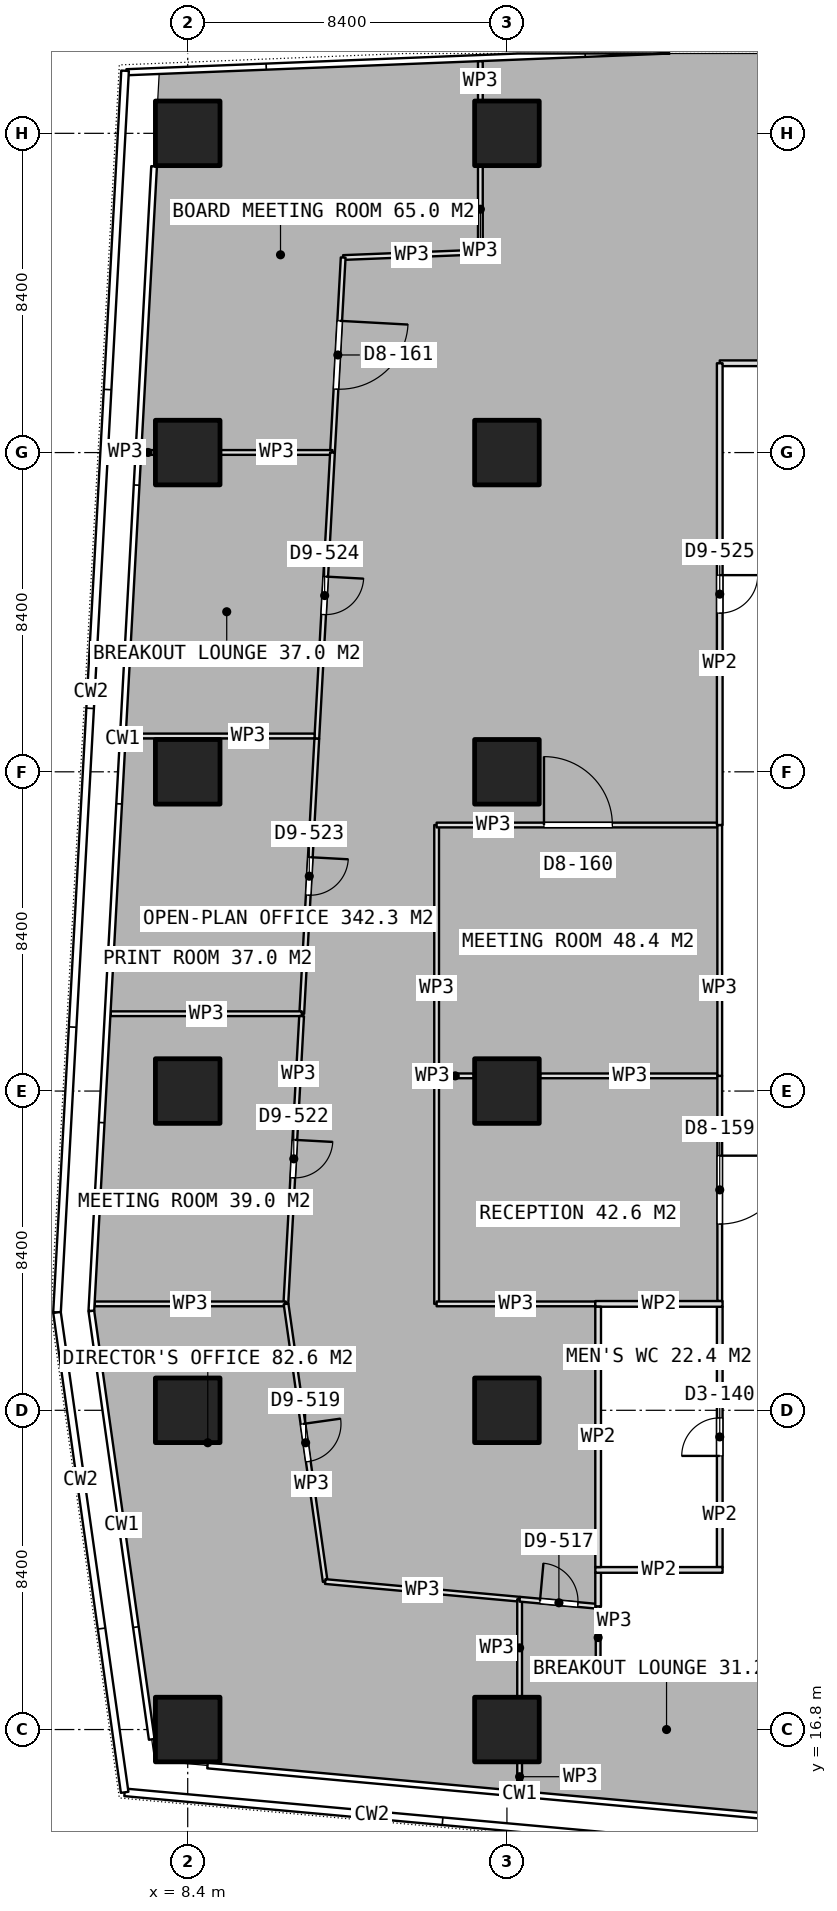
"""IFC4 building model, lengths in metres.
Left out: names, types, materials, properties, quantities, classifications, styles, units other than length and angle.
Written with IfcOpenShell. Run it as: python <this file> out.ifc"""

import sys

from ifc_helpers import new_model, si_unit, direction, frame, frame_2d, origin, origin_2d, place, context, subcontext, project, spatial, rectangle, extrude, element, fill, save


model = new_model("IFC4")
c1 = context("Model", 3, precision=1e-05, world=origin(), true_north=direction((0.0, 1.0)))
c2 = subcontext(c1, "Body", "Model", "MODEL_VIEW")
j1 = project(units=[si_unit("LENGTHUNIT", "METRE"), si_unit("PLANEANGLEUNIT", "RADIAN")], contexts=[c1])
p1 = place(None, origin())
s1 = spatial("IfcSite", under=j1, at=p1, CompositionType="ELEMENT")
p2 = place(p1, origin())
s2 = spatial("IfcBuilding", under=s1, at=p2, CompositionType="ELEMENT")
p3 = place(p2, frame((0.0, 0.0, 132.8)))
s3 = spatial("IfcBuildingStorey", under=s2, at=p3, CompositionType="ELEMENT", Elevation=132.8)
for number, where, z_axis, x_axis in (
    (1, (8.4, 16.8, 0.0), (0.0, 0.0, 1.0), (1.0, 0.0, 0.0)),
    (2, (8.4, 25.2, 0.0), (0.0, 0.0, 1.0), (1.0, 0.0, 0.0)),
    (3, (8.4, 33.6, 0.0), (0.0, 0.0, 1.0), (1.0, 0.0, 0.0)),
    (4, (8.4, 42.0, 0.0), (0.0, 0.0, 1.0), (1.0, 0.0, 0.0)),
    (5, (8.4, 50.4, 0.0), (0.0, 0.0, 1.0), (1.0, 0.0, 0.0)),
    (6, (8.4, 58.8, 0.0), (0.0, 0.0, 1.0), (1.0, 0.0, 0.0)),
    (7, (16.8, 16.8, 0.0), (0.0, 0.0, 1.0), (1.0, 0.0, 0.0)),
    (8, (16.8, 25.2, 0.0), (0.0, 0.0, 1.0), (1.0, 0.0, 0.0)),
    (9, (16.8, 33.6, 0.0), (0.0, 0.0, 1.0), (1.0, 0.0, 0.0)),
    (10, (16.8, 42.0, 0.0), (0.0, 0.0, 1.0), (1.0, 0.0, 0.0)),
    (11, (16.8, 50.4, 0.0), (0.0, 0.0, 1.0), (1.0, 0.0, 0.0)),
    (12, (16.8, 58.8, 0.0), (0.0, 0.0, 1.0), (1.0, 0.0, 0.0)),
):
    element("IfcColumn", number, at=place(p3, frame(where, z_axis=z_axis, x_axis=x_axis)), inside=s3, PredefinedType="COLUMN", context=c2, shape_type="SweptSolid", body=[
        extrude(rectangle(XDim=1.7, YDim=1.7, at=origin_2d()), origin(), (0.0, 0.0, 1.0), 3.75),
    ])
for number, where, z_axis, x_axis in (
    (13, (19.125, 21.0, 0.0), (0.0, 0.0, 1.0), (1.0, 0.0, 0.0)),
    (14, (19.125, 28.0, 0.0), (0.0, 0.0, 1.0), (1.0, 0.0, 0.0)),
):
    element("IfcWall", number, at=place(p3, frame(where, z_axis=z_axis, x_axis=x_axis)), inside=s3, PredefinedType="PARTITIONING", context=c2, shape_type="SweptSolid", body=[
        extrude(rectangle(XDim=3.35, YDim=0.15, at=frame_2d((1.675, 0.0))), origin(), (0.0, 0.0, 1.0), 3.5),
    ])
p4 = place(p3, frame((19.2, 21.075, 0.0), z_axis=(0.0, 0.0, 1.0), x_axis=(0.0, 1.0, 0.0)))
e15 = element("IfcWall", 15, at=p4, inside=s3, PredefinedType="PARTITIONING", context=c2, shape_type="SweptSolid", body=[
    extrude(rectangle(XDim=6.85, YDim=0.15, at=frame_2d((3.425, 0.0))), origin(), (0.0, 0.0, 1.0), 3.5),
])
p5 = place(p3, frame((22.4, 21.075, 0.0), z_axis=(0.0, 0.0, 1.0), x_axis=(0.0, 1.0, 0.0)))
e16 = element("IfcWall", 16, at=p5, inside=s3, PredefinedType="PARTITIONING", context=c2, shape_type="SweptSolid", body=[
    extrude(rectangle(XDim=6.85, YDim=0.15, at=frame_2d((3.425, 0.0))), origin(), (0.0, 0.0, 1.0), 3.5),
])
p6 = place(p5, frame((2.925, 0.0, 0.0)))
e17 = element("IfcOpeningElement", 17, at=p6, cuts=e16, PredefinedType="OPENING", context=c2, shape_type="SweptSolid", body=[
    extrude(rectangle(XDim=1.0, YDim=2.1, at=frame_2d((0.5, 1.05))), frame((0.0, 0.085, 0.0), z_axis=(0.0, -1.0, 0.0), x_axis=(1.0, 0.0, 0.0)), (0.0, 0.0, 1.0), 0.17),
])
p7 = place(p3, frame((16.101, 60.7, 0.0), z_axis=(0.0, 0.0, 1.0), x_axis=(0.0, -1.0, 0.0)))
e18 = element("IfcWall", 18, at=p7, inside=s3, PredefinedType="PARTITIONING", context=c2, shape_type="SweptSolid", body=[
    extrude(rectangle(XDim=1.03, YDim=0.125, at=frame_2d((0.515, 0.0))), origin(), (0.0, 0.0, 1.0), 3.5),
])
p8 = place(p3, frame((16.101, 57.93, 0.0), z_axis=(0.0, 0.0, 1.0), x_axis=(0.0, -1.0, 0.0)))
e19 = element("IfcWall", 19, at=p8, inside=s3, PredefinedType="PARTITIONING", context=c2, shape_type="SweptSolid", body=[
    extrude(rectangle(XDim=2.254, YDim=0.125, at=frame_2d((1.127, 0.0))), origin(), (0.0, 0.0, 1.0), 3.5),
])
p9 = place(p3, frame((16.101, 55.676, 0.0), z_axis=(0.0, 0.0, 1.0), x_axis=(-0.999204947676, -0.039868189567, 0.0)))
e20 = element("IfcWall", 20, at=p9, inside=s3, PredefinedType="PARTITIONING", context=c2, shape_type="SweptSolid", body=[
    extrude(rectangle(XDim=3.613, YDim=0.125, at=frame_2d((1.807, 0.0))), origin(), (0.0, 0.0, 1.0), 3.5),
])
p10 = place(p3, frame((12.491, 55.532, 0.0), z_axis=(0.0, 0.0, 1.0), x_axis=(-0.054706604425, -0.998502472422, 0.0)))
e21 = element("IfcWall", 21, at=p10, inside=s3, PredefinedType="PARTITIONING", context=c2, shape_type="SweptSolid", body=[
    extrude(rectangle(XDim=5.137, YDim=0.125, at=frame_2d((2.568, 0.0))), origin(), (0.0, 0.0, 1.0), 3.5),
])
p11 = place(p10, frame((1.668, 0.0, 0.0)))
e22 = element("IfcOpeningElement", 22, at=p11, cuts=e21, PredefinedType="OPENING", context=c2, shape_type="SweptSolid", body=[
    extrude(rectangle(XDim=1.8, YDim=2.1, at=frame_2d((0.9, 1.05))), frame((0.0, 0.073, 0.0), z_axis=(0.0, -1.0, 0.0), x_axis=(1.0, 0.0, 0.0)), (0.0, 0.0, 1.0), 0.145),
])
p12 = place(p3, frame((12.21, 50.403, 0.0), z_axis=(0.0, 0.0, 1.0), x_axis=(-1.0, 0.0, 0.0)))
e23 = element("IfcWall", 23, at=p12, inside=s3, PredefinedType="PARTITIONING", context=c2, shape_type="SweptSolid", body=[
    extrude(rectangle(XDim=2.94, YDim=0.125, at=frame_2d((1.47, 0.0))), origin(), (0.0, 0.0, 1.0), 3.5),
])
p13 = place(p3, frame((7.53, 50.403, 0.0), z_axis=(0.0, 0.0, 1.0), x_axis=(-1.0, 0.0, 0.0)))
e24 = element("IfcWall", 24, at=p13, inside=s3, PredefinedType="PARTITIONING", context=c2, shape_type="SweptSolid", body=[
    extrude(rectangle(XDim=0.347, YDim=0.125, at=frame_2d((0.173, 0.0))), origin(), (0.0, 0.0, 1.0), 3.5),
])
p14 = place(p3, frame((12.21, 50.402, 0.0), z_axis=(0.0, 0.0, 1.0), x_axis=(-0.054750918435, -0.998500043531, 0.0)))
e25 = element("IfcWall", 25, at=p14, inside=s3, PredefinedType="PARTITIONING", context=c2, shape_type="SweptSolid", body=[
    extrude(rectangle(XDim=7.54, YDim=0.125, at=frame_2d((3.77, 0.0))), origin(), (0.0, 0.0, 1.0), 3.5),
])
p15 = place(p14, frame((3.27, 0.0, 0.0)))
e26 = element("IfcOpeningElement", 26, at=p15, cuts=e25, PredefinedType="OPENING", context=c2, shape_type="SweptSolid", body=[
    extrude(rectangle(XDim=1.0, YDim=2.1, at=frame_2d((0.5, 1.05))), frame((0.0, 0.073, 0.0), z_axis=(0.0, -1.0, 0.0), x_axis=(1.0, 0.0, 0.0)), (0.0, 0.0, 1.0), 0.145),
])
p16 = place(p3, frame((11.738, 42.943, 0.0), z_axis=(0.0, 0.0, 1.0), x_axis=(-1.0, 0.0, 0.0)))
e27 = element("IfcWall", 27, at=p16, inside=s3, PredefinedType="PARTITIONING", context=c2, shape_type="SweptSolid", body=[
    extrude(rectangle(XDim=4.994, YDim=0.125, at=frame_2d((2.497, 0.0))), origin(), (0.0, 0.0, 1.0), 3.5),
])
p17 = place(p3, frame((11.797, 42.872, 0.0), z_axis=(0.0, 0.0, 1.0), x_axis=(-0.0546696622, -0.998504495751, 0.0)))
e28 = element("IfcWall", 28, at=p17, inside=s3, PredefinedType="PARTITIONING", context=c2, shape_type="SweptSolid", body=[
    extrude(rectangle(XDim=7.248, YDim=0.125, at=frame_2d((3.624, 0.0))), origin(), (0.0, 0.0, 1.0), 3.5),
])
p18 = place(p17, frame((3.124, 0.0, 0.0)))
e29 = element("IfcOpeningElement", 29, at=p18, cuts=e28, PredefinedType="OPENING", context=c2, shape_type="SweptSolid", body=[
    extrude(rectangle(XDim=1.0, YDim=2.1, at=frame_2d((0.5, 1.05))), frame((0.0, 0.073, 0.0), z_axis=(0.0, -1.0, 0.0), x_axis=(1.0, 0.0, 0.0)), (0.0, 0.0, 1.0), 0.145),
])
p19 = place(p3, frame((11.401, 35.635, 0.0), z_axis=(0.0, 0.0, 1.0), x_axis=(-1.0, 0.0, 0.0)))
e30 = element("IfcWall", 30, at=p19, inside=s3, PredefinedType="PARTITIONING", context=c2, shape_type="SweptSolid", body=[
    extrude(rectangle(XDim=5.028, YDim=0.125, at=frame_2d((2.514, 0.0))), origin(), (0.0, 0.0, 1.0), 3.5),
])
p20 = place(p3, frame((11.397, 35.572, 0.0), z_axis=(0.0, 0.0, 1.0), x_axis=(-0.054730034511, -0.998501188443, 0.0)))
e31 = element("IfcWall", 31, at=p20, inside=s3, PredefinedType="PARTITIONING", context=c2, shape_type="SweptSolid", body=[
    extrude(rectangle(XDim=7.583, YDim=0.125, at=frame_2d((3.792, 0.0))), origin(), (0.0, 0.0, 1.0), 3.5),
])
p21 = place(p20, frame((3.261, 0.0, 0.0)))
e32 = element("IfcOpeningElement", 32, at=p21, cuts=e31, PredefinedType="OPENING", context=c2, shape_type="SweptSolid", body=[
    extrude(rectangle(XDim=1.0, YDim=2.1, at=frame_2d((0.5, 1.05))), frame((0.0, 0.073, 0.0), z_axis=(0.0, -1.0, 0.0), x_axis=(1.0, 0.0, 0.0)), (0.0, 0.0, 1.0), 0.145),
])
p22 = place(p3, frame((10.982, 28.0, 0.0), z_axis=(0.0, 0.0, 1.0), x_axis=(-1.0, 0.0, 0.0)))
e33 = element("IfcWall", 33, at=p22, inside=s3, PredefinedType="PARTITIONING", context=c2, shape_type="SweptSolid", body=[
    extrude(rectangle(XDim=5.028, YDim=0.125, at=frame_2d((2.514, 0.0))), origin(), (0.0, 0.0, 1.0), 3.5),
])
p23 = place(p3, frame((10.988, 27.999, 0.0), z_axis=(0.0, 0.0, 1.0), x_axis=(0.139623458625, -0.990204670662, 0.0)))
e34 = element("IfcWall", 34, at=p23, inside=s3, PredefinedType="PARTITIONING", context=c2, shape_type="SweptSolid", body=[
    extrude(rectangle(XDim=7.377, YDim=0.125, at=frame_2d((3.688, 0.0))), origin(), (0.0, 0.0, 1.0), 3.5),
])
p24 = place(p23, frame((3.189, 0.0, 0.0)))
e35 = element("IfcOpeningElement", 35, at=p24, cuts=e34, PredefinedType="OPENING", context=c2, shape_type="SweptSolid", body=[
    extrude(rectangle(XDim=1.0, YDim=2.1, at=frame_2d((0.5, 1.05))), frame((0.0, 0.073, 0.0), z_axis=(0.0, -1.0, 0.0), x_axis=(1.0, 0.0, 0.0)), (0.0, 0.0, 1.0), 0.145),
])
p25 = place(p3, frame((12.018, 20.694, 0.0), z_axis=(0.0, 0.0, 1.0), x_axis=(0.995893206468, -0.090535746043, 0.0)))
e36 = element("IfcWall", 36, at=p25, inside=s3, PredefinedType="PARTITIONING", context=c2, shape_type="SweptSolid", body=[
    extrude(rectangle(XDim=5.137, YDim=0.125, at=frame_2d((2.568, 0.0))), origin(), (0.0, 0.0, 1.0), 3.5),
])
p26 = place(p3, frame((17.134, 20.229, 0.0), z_axis=(0.0, 0.0, 1.0), x_axis=(0.0, -1.0, 0.0)))
e37 = element("IfcWall", 37, at=p26, inside=s3, PredefinedType="PARTITIONING", context=c2, shape_type="SweptSolid", body=[
    extrude(rectangle(XDim=2.559, YDim=0.125, at=frame_2d((1.28, 0.0))), origin(), (0.0, 0.0, 1.0), 3.5),
])
p27 = place(p3, frame((17.134, 15.93, 0.0), z_axis=(0.0, 0.0, 1.0), x_axis=(0.0, -1.0, 0.0)))
e38 = element("IfcWall", 38, at=p27, inside=s3, PredefinedType="PARTITIONING", context=c2, shape_type="SweptSolid", body=[
    extrude(rectangle(XDim=0.742, YDim=0.125, at=frame_2d((0.371, 0.0))), origin(), (0.0, 0.0, 1.0), 3.5),
])
p28 = place(p3, frame((19.2, 18.4, 0.0), z_axis=(0.0, 0.0, 1.0), x_axis=(1.0, 0.0, 0.0)))
e39 = element("IfcWall", 39, at=p28, inside=s3, PredefinedType="PARTITIONING", context=c2, shape_type="SweptSolid", body=[
    extrude(rectangle(XDim=6.179, YDim=0.125, at=frame_2d((3.089, 0.0))), origin(), (0.0, 0.0, 1.0), 3.5),
])
p29 = place(p3, frame((17.135, 20.229, 0.0), z_axis=(0.0, 0.0, 1.0), x_axis=(0.995881616909, -0.090663140816, 0.0)))
e40 = element("IfcWall", 40, at=p29, inside=s3, PredefinedType="PARTITIONING", context=c2, shape_type="SweptSolid", body=[
    extrude(rectangle(XDim=2.073, YDim=0.125, at=frame_2d((1.037, 0.0))), origin(), (0.0, 0.0, 1.0), 3.5),
])
p30 = place(p29, frame((0.537, 0.0, 0.0)))
e41 = element("IfcOpeningElement", 41, at=p30, cuts=e40, PredefinedType="OPENING", context=c2, shape_type="SweptSolid", body=[
    extrude(rectangle(XDim=1.0, YDim=2.1, at=frame_2d((0.5, 1.05))), frame((0.0, 0.073, 0.0), z_axis=(0.0, -1.0, 0.0), x_axis=(1.0, 0.0, 0.0)), (0.0, 0.0, 1.0), 0.145),
])
p31 = place(p3, frame((19.2, 20.041, 0.0), z_axis=(0.0, 0.0, 1.0), x_axis=(0.0, -1.0, 0.0)))
e42 = element("IfcWall", 42, at=p31, inside=s3, PredefinedType="PARTITIONING", context=c2, shape_type="SweptSolid", body=[
    extrude(rectangle(XDim=1.641, YDim=0.125, at=frame_2d((0.821, 0.0))), origin(), (0.0, 0.0, 1.0), 3.5),
])
p32 = place(p3, frame((14.95, 28.0, 0.0), z_axis=(0.0, 0.0, 1.0), x_axis=(0.0, 1.0, 0.0)))
e43 = element("IfcWall", 43, at=p32, inside=s3, PredefinedType="PARTITIONING", context=c2, shape_type="SweptSolid", body=[
    extrude(rectangle(XDim=6.0, YDim=0.125, at=frame_2d((3.0, 0.0))), origin(), (0.0, 0.0, 1.0), 3.5),
])
p33 = place(p3, frame((14.95, 34.0, 0.0), z_axis=(0.0, 0.0, 1.0), x_axis=(1.0, 0.0, 0.0)))
e44 = element("IfcWall", 44, at=p33, inside=s3, PredefinedType="PARTITIONING", context=c2, shape_type="SweptSolid", body=[
    extrude(rectangle(XDim=0.98, YDim=0.125, at=frame_2d((0.49, 0.0))), origin(), (0.0, 0.0, 1.0), 3.5),
])
p34 = place(p3, frame((17.67, 34.0, 0.0), z_axis=(0.0, 0.0, 1.0), x_axis=(1.0, 0.0, 0.0)))
e45 = element("IfcWall", 45, at=p34, inside=s3, PredefinedType="PARTITIONING", context=c2, shape_type="SweptSolid", body=[
    extrude(rectangle(XDim=4.73, YDim=0.125, at=frame_2d((2.365, 0.0))), origin(), (0.0, 0.0, 1.0), 3.5),
])
p35 = place(p3, frame((22.4, 34.0, 0.0), z_axis=(0.0, 0.0, 1.0), x_axis=(0.0, -1.0, 0.0)))
e46 = element("IfcWall", 46, at=p35, inside=s3, PredefinedType="PARTITIONING", context=c2, shape_type="SweptSolid", body=[
    extrude(rectangle(XDim=5.925, YDim=0.125, at=frame_2d((2.962, 0.0))), origin(), (0.0, 0.0, 1.0), 3.5),
])
p36 = place(p35, frame((2.1, 0.0, 0.0)))
e47 = element("IfcOpeningElement", 47, at=p36, cuts=e46, PredefinedType="OPENING", context=c2, shape_type="SweptSolid", body=[
    extrude(rectangle(XDim=1.8, YDim=2.1, at=frame_2d((0.9, 1.05))), frame((0.0, 0.073, 0.0), z_axis=(0.0, -1.0, 0.0), x_axis=(1.0, 0.0, 0.0)), (0.0, 0.0, 1.0), 0.145),
])
p37 = place(p3, frame((19.125, 28.0, 0.0), z_axis=(0.0, 0.0, 1.0), x_axis=(-1.0, 0.0, 0.0)))
e48 = element("IfcWall", 48, at=p37, inside=s3, PredefinedType="PARTITIONING", context=c2, shape_type="SweptSolid", body=[
    extrude(rectangle(XDim=4.175, YDim=0.125, at=frame_2d((2.087, 0.0))), origin(), (0.0, 0.0, 1.0), 3.5),
])
p38 = place(p3, frame((14.95, 34.0, 0.0), z_axis=(0.0, 0.0, 1.0), x_axis=(0.0, 1.0, 0.0)))
e49 = element("IfcWall", 49, at=p38, inside=s3, PredefinedType="PARTITIONING", context=c2, shape_type="SweptSolid", body=[
    extrude(rectangle(XDim=6.6, YDim=0.125, at=frame_2d((3.3, 0.0))), origin(), (0.0, 0.0, 1.0), 3.5),
])
p39 = place(p3, frame((14.95, 40.6, 0.0), z_axis=(0.0, 0.0, 1.0), x_axis=(1.0, 0.0, 0.0)))
e50 = element("IfcWall", 50, at=p39, inside=s3, PredefinedType="PARTITIONING", context=c2, shape_type="SweptSolid", body=[
    extrude(rectangle(XDim=7.45, YDim=0.125, at=frame_2d((3.725, 0.0))), origin(), (0.0, 0.0, 1.0), 3.5),
])
p40 = place(p39, frame((2.825, 0.0, 0.0)))
e51 = element("IfcOpeningElement", 51, at=p40, cuts=e50, PredefinedType="OPENING", context=c2, shape_type="SweptSolid", body=[
    extrude(rectangle(XDim=1.8, YDim=2.1, at=frame_2d((0.9, 1.05))), frame((0.0, 0.073, 0.0), z_axis=(0.0, -1.0, 0.0), x_axis=(1.0, 0.0, 0.0)), (0.0, 0.0, 1.0), 0.145),
])
p41 = place(p3, frame((22.4, 40.6, 0.0), z_axis=(0.0, 0.0, 1.0), x_axis=(0.0, -1.0, 0.0)))
e52 = element("IfcWall", 52, at=p41, inside=s3, PredefinedType="PARTITIONING", context=c2, shape_type="SweptSolid", body=[
    extrude(rectangle(XDim=6.6, YDim=0.125, at=frame_2d((3.3, 0.0))), origin(), (0.0, 0.0, 1.0), 3.5),
])
p42 = place(p3, frame((33.826, 52.75, 0.0), z_axis=(0.0, 0.0, 1.0), x_axis=(-1.0, 0.0, 0.0)))
e53 = element("IfcWall", 53, at=p42, inside=s3, PredefinedType="PARTITIONING", context=c2, shape_type="SweptSolid", body=[
    extrude(rectangle(XDim=11.426, YDim=0.15, at=frame_2d((5.713, 0.0))), origin(), (0.0, 0.0, 1.0), 3.5),
])
p43 = place(p3, frame((22.4, 52.75, 0.0), z_axis=(0.0, 0.0, 1.0), x_axis=(0.0, -1.0, 0.0)))
e54 = element("IfcWall", 54, at=p43, inside=s3, PredefinedType="PARTITIONING", context=c2, shape_type="SweptSolid", body=[
    extrude(rectangle(XDim=12.15, YDim=0.15, at=frame_2d((6.075, 0.0))), origin(), (0.0, 0.0, 1.0), 3.5),
])
p44 = place(p43, frame((5.575, 0.0, 0.0)))
e55 = element("IfcOpeningElement", 55, at=p44, cuts=e54, PredefinedType="OPENING", context=c2, shape_type="SweptSolid", body=[
    extrude(rectangle(XDim=1.0, YDim=2.1, at=frame_2d((0.5, 1.05))), frame((0.0, 0.085, 0.0), z_axis=(0.0, -1.0, 0.0), x_axis=(1.0, 0.0, 0.0)), (0.0, 0.0, 1.0), 0.17),
])
p45 = place(p3, frame((19.2, 20.925, 0.0), z_axis=(0.0, 0.0, 1.0), x_axis=(0.0, -1.0, 0.0)))
e56 = element("IfcWall", 56, at=p45, inside=s3, PredefinedType="PARTITIONING", context=c2, shape_type="SweptSolid", body=[
    extrude(rectangle(XDim=0.884, YDim=0.15, at=frame_2d((0.442, 0.0))), origin(), (0.0, 0.0, 1.0), 3.5),
])
p46 = place(p6, origin())
e57 = element("IfcDoor", 57, at=p46, inside=s3, OperationType="SINGLE_SWING_LEFT", PredefinedType="DOOR", context=c2, shape_type="SweptSolid", body=[
    extrude(rectangle(XDim=1.0, YDim=2.1, at=frame_2d((0.5, 1.05))), frame((0.0, 0.025, 0.0), z_axis=(0.0, -1.0, 0.0), x_axis=(1.0, 0.0, 0.0)), (0.0, 0.0, 1.0), 0.05),
])
fill(e17, e57)
p47 = place(p11, origin())
e58 = element("IfcDoor", 58, at=p47, inside=s3, OperationType="DOUBLE_DOOR_SINGLE_SWING", PredefinedType="DOOR", context=c2, shape_type="SweptSolid", body=[
    extrude(rectangle(XDim=1.8, YDim=2.1, at=frame_2d((0.9, 1.05))), frame((0.0, 0.025, 0.0), z_axis=(0.0, -1.0, 0.0), x_axis=(1.0, 0.0, 0.0)), (0.0, 0.0, 1.0), 0.05),
])
fill(e22, e58)
p48 = place(p15, origin())
e59 = element("IfcDoor", 59, at=p48, inside=s3, OperationType="SINGLE_SWING_LEFT", PredefinedType="DOOR", context=c2, shape_type="SweptSolid", body=[
    extrude(rectangle(XDim=1.0, YDim=2.1, at=frame_2d((0.5, 1.05))), frame((0.0, 0.025, 0.0), z_axis=(0.0, -1.0, 0.0), x_axis=(1.0, 0.0, 0.0)), (0.0, 0.0, 1.0), 0.05),
])
fill(e26, e59)
p49 = place(p18, origin())
e60 = element("IfcDoor", 60, at=p49, inside=s3, OperationType="SINGLE_SWING_LEFT", PredefinedType="DOOR", context=c2, shape_type="SweptSolid", body=[
    extrude(rectangle(XDim=1.0, YDim=2.1, at=frame_2d((0.5, 1.05))), frame((0.0, 0.025, 0.0), z_axis=(0.0, -1.0, 0.0), x_axis=(1.0, 0.0, 0.0)), (0.0, 0.0, 1.0), 0.05),
])
fill(e29, e60)
p50 = place(p21, origin())
e61 = element("IfcDoor", 61, at=p50, inside=s3, OperationType="SINGLE_SWING_LEFT", PredefinedType="DOOR", context=c2, shape_type="SweptSolid", body=[
    extrude(rectangle(XDim=1.0, YDim=2.1, at=frame_2d((0.5, 1.05))), frame((0.0, 0.025, 0.0), z_axis=(0.0, -1.0, 0.0), x_axis=(1.0, 0.0, 0.0)), (0.0, 0.0, 1.0), 0.05),
])
fill(e32, e61)
p51 = place(p24, origin())
e62 = element("IfcDoor", 62, at=p51, inside=s3, OperationType="SINGLE_SWING_LEFT", PredefinedType="DOOR", context=c2, shape_type="SweptSolid", body=[
    extrude(rectangle(XDim=1.0, YDim=2.1, at=frame_2d((0.5, 1.05))), frame((0.0, 0.025, 0.0), z_axis=(0.0, -1.0, 0.0), x_axis=(1.0, 0.0, 0.0)), (0.0, 0.0, 1.0), 0.05),
])
fill(e35, e62)
p52 = place(p30, origin())
e63 = element("IfcDoor", 63, at=p52, inside=s3, OperationType="SINGLE_SWING_LEFT", PredefinedType="DOOR", context=c2, shape_type="SweptSolid", body=[
    extrude(rectangle(XDim=1.0, YDim=2.1, at=frame_2d((0.5, 1.05))), frame((0.0, 0.025, 0.0), z_axis=(0.0, -1.0, 0.0), x_axis=(1.0, 0.0, 0.0)), (0.0, 0.0, 1.0), 0.05),
])
fill(e41, e63)
p53 = place(p36, origin())
e64 = element("IfcDoor", 64, at=p53, inside=s3, OperationType="DOUBLE_DOOR_SINGLE_SWING", PredefinedType="DOOR", context=c2, shape_type="SweptSolid", body=[
    extrude(rectangle(XDim=1.8, YDim=2.1, at=frame_2d((0.9, 1.05))), frame((0.0, 0.025, 0.0), z_axis=(0.0, -1.0, 0.0), x_axis=(1.0, 0.0, 0.0)), (0.0, 0.0, 1.0), 0.05),
])
fill(e47, e64)
p54 = place(p40, origin())
e65 = element("IfcDoor", 65, at=p54, inside=s3, OperationType="DOUBLE_DOOR_SINGLE_SWING", PredefinedType="DOOR", context=c2, shape_type="SweptSolid", body=[
    extrude(rectangle(XDim=1.8, YDim=2.1, at=frame_2d((0.9, 1.05))), frame((0.0, 0.025, 0.0), z_axis=(0.0, -1.0, 0.0), x_axis=(1.0, 0.0, 0.0)), (0.0, 0.0, 1.0), 0.05),
])
fill(e51, e65)
p55 = place(p44, origin())
e66 = element("IfcDoor", 66, at=p55, inside=s3, OperationType="SINGLE_SWING_LEFT", PredefinedType="DOOR", context=c2, shape_type="SweptSolid", body=[
    extrude(rectangle(XDim=1.0, YDim=2.1, at=frame_2d((0.5, 1.05))), frame((0.0, 0.025, 0.0), z_axis=(0.0, -1.0, 0.0), x_axis=(1.0, 0.0, 0.0)), (0.0, 0.0, 1.0), 0.05),
])
fill(e55, e66)
save(model, sys.argv[1])
